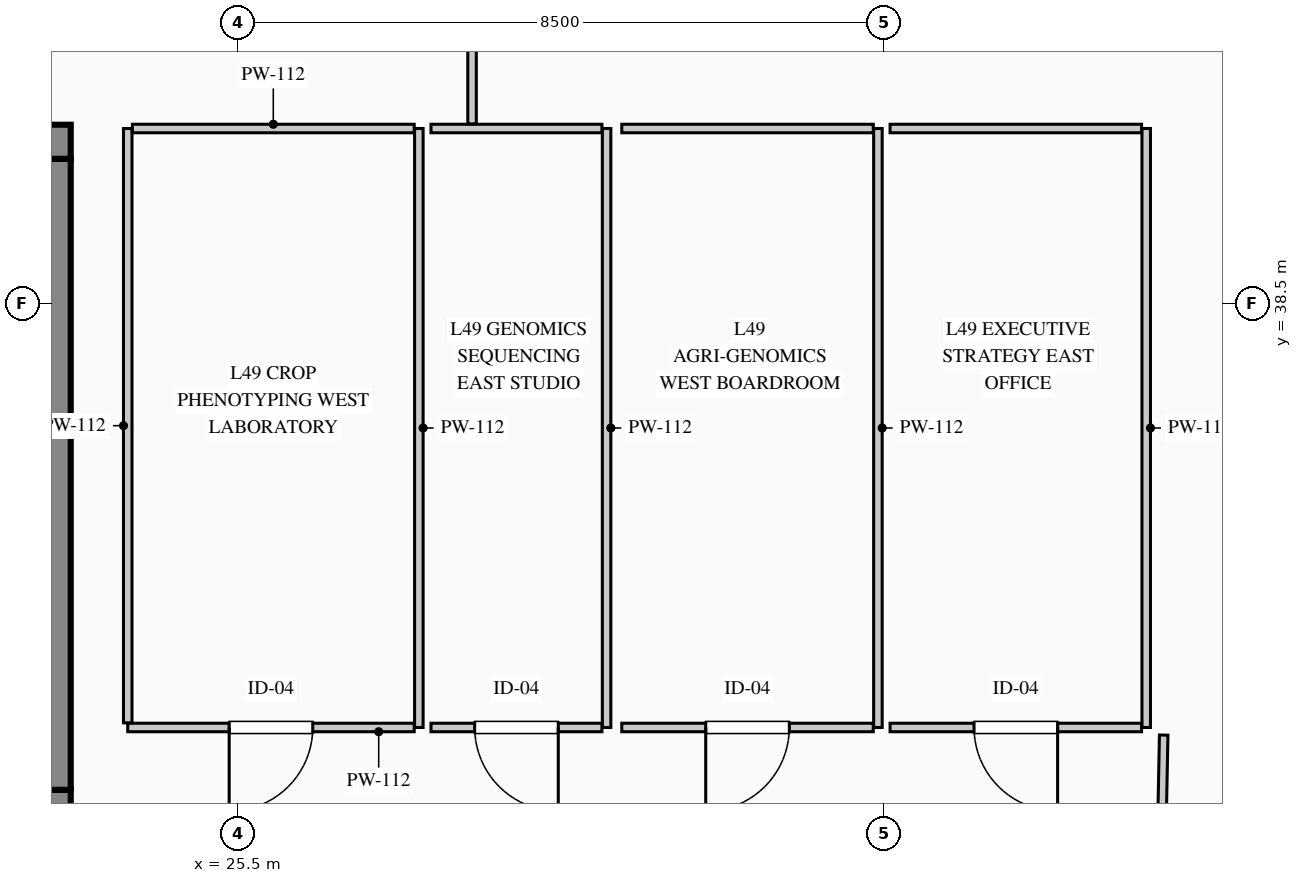
"""IFC4 building model, lengths in metres.
Left out: names, types, materials, properties, quantities, classifications, styles, units other than length and angle.
Written with IfcOpenShell. Run it as: python <this file> out.ifc"""

import sys

from ifc_helpers import new_model, si_unit, direction, frame, frame_2d, origin, place, context, subcontext, project, spatial, rectangle, extrude, element, fill, save


model = new_model("IFC4")
c1 = context("Model", 3, precision=1e-05, world=origin(), true_north=direction((0.0, 1.0)))
c2 = subcontext(c1, "Body", "Model", "MODEL_VIEW")
j1 = project(units=[si_unit("LENGTHUNIT", "METRE"), si_unit("PLANEANGLEUNIT", "RADIAN")], contexts=[c1])
p1 = place(None, origin())
s1 = spatial("IfcSite", under=j1, at=p1, CompositionType="ELEMENT")
p2 = place(p1, origin())
s2 = spatial("IfcBuilding", under=s1, at=p2, CompositionType="ELEMENT")
p3 = place(p2, frame((0.0, 0.0, 207.45)))
s3 = spatial("IfcBuildingStorey", under=s2, at=p3, CompositionType="ELEMENT", Elevation=207.45)
p4 = place(p3, frame((5.55, 40.625, 0.0), z_axis=(0.0, 0.0, 1.0), x_axis=(1.0, 0.0, 0.0)))
e1 = element("IfcWall", 1, at=p4, inside=s3, PredefinedType="SHEAR", context=c2, shape_type="SweptSolid", body=[
    extrude(rectangle(XDim=17.75, YDim=0.45, at=frame_2d((8.875, 0.0))), origin(), (0.0, 0.0, 1.0), 3.95),
])
p5 = place(p4, frame((15.895, 0.0, 0.0)))
e2 = element("IfcOpeningElement", 2, at=p5, cuts=e1, PredefinedType="OPENING", context=c2, shape_type="SweptSolid", body=[
    extrude(rectangle(XDim=1.18, YDim=2.25, at=frame_2d((0.59, 1.125))), frame((0.0, 0.235, 0.0), z_axis=(0.0, -1.0, 0.0), x_axis=(1.0, 0.0, 0.0)), (0.0, 0.0, 1.0), 0.47),
])
p6 = place(p3, frame((5.55, 31.875, 0.0), z_axis=(0.0, 0.0, 1.0), x_axis=(1.0, 0.0, 0.0)))
e3 = element("IfcWall", 3, at=p6, inside=s3, PredefinedType="SHEAR", context=c2, shape_type="SweptSolid", body=[
    extrude(rectangle(XDim=17.75, YDim=0.45, at=frame_2d((8.875, 0.0))), origin(), (0.0, 0.0, 1.0), 3.95),
])
p7 = place(p6, frame((3.1, 0.0, 0.0)))
e4 = element("IfcOpeningElement", 4, at=p7, cuts=e3, PredefinedType="OPENING", context=c2, shape_type="SweptSolid", body=[
    extrude(rectangle(XDim=1.2, YDim=2.2, at=frame_2d((0.6, 1.1))), frame((0.0, 0.235, 0.0), z_axis=(0.0, -1.0, 0.0), x_axis=(1.0, 0.0, 0.0)), (0.0, 0.0, 1.0), 0.47),
])
p8 = place(p6, frame((6.95, 0.0, 0.0)))
e5 = element("IfcOpeningElement", 5, at=p8, cuts=e3, PredefinedType="OPENING", context=c2, shape_type="SweptSolid", body=[
    extrude(rectangle(XDim=1.2, YDim=2.2, at=frame_2d((0.6, 1.1))), frame((0.0, 0.235, 0.0), z_axis=(0.0, -1.0, 0.0), x_axis=(1.0, 0.0, 0.0)), (0.0, 0.0, 1.0), 0.47),
])
p9 = place(p6, frame((8.8, 0.0, 0.0)))
e6 = element("IfcOpeningElement", 6, at=p9, cuts=e3, PredefinedType="OPENING", context=c2, shape_type="SweptSolid", body=[
    extrude(rectangle(XDim=1.15, YDim=2.2, at=frame_2d((0.575, 1.1))), frame((0.0, 0.235, 0.0), z_axis=(0.0, -1.0, 0.0), x_axis=(1.0, 0.0, 0.0)), (0.0, 0.0, 1.0), 0.47),
])
p10 = place(p6, frame((15.9, 0.0, 0.0)))
e7 = element("IfcOpeningElement", 7, at=p10, cuts=e3, PredefinedType="OPENING", context=c2, shape_type="SweptSolid", body=[
    extrude(rectangle(XDim=1.2, YDim=2.2, at=frame_2d((0.6, 1.1))), frame((0.0, 0.235, 0.0), z_axis=(0.0, -1.0, 0.0), x_axis=(1.0, 0.0, 0.0)), (0.0, 0.0, 1.0), 0.47),
])
p11 = place(p3, frame((23.075, 32.1, 0.0), z_axis=(0.0, 0.0, 1.0), x_axis=(0.0, 1.0, 0.0)))
e8 = element("IfcWall", 8, at=p11, inside=s3, PredefinedType="SHEAR", context=c2, shape_type="SweptSolid", body=[
    extrude(rectangle(XDim=8.3, YDim=0.45, at=frame_2d((4.15, 0.0))), origin(), (0.0, 0.0, 1.0), 3.95),
])
p12 = place(p3, frame((27.88, 40.8, 0.0), z_axis=(0.0, 0.0, 1.0), x_axis=(0.0, -1.0, 0.0)))
e9 = element("IfcWall", 9, at=p12, inside=s3, PredefinedType="PARTITIONING", context=c2, shape_type="SweptSolid", body=[
    extrude(rectangle(XDim=7.88, YDim=0.112, at=frame_2d((3.94, 0.0))), origin(), (0.0, 0.0, 1.0), 3.7),
])
p13 = place(p3, frame((27.819, 32.92, 0.0), z_axis=(0.0, 0.0, 1.0), x_axis=(-1.0, 0.0, 0.0)))
e10 = element("IfcWall", 10, at=p13, inside=s3, PredefinedType="PARTITIONING", context=c2, shape_type="SweptSolid", body=[
    extrude(rectangle(XDim=3.769, YDim=0.112, at=frame_2d((1.885, 0.0))), origin(), (0.0, 0.0, 1.0), 3.7),
])
p14 = place(p13, frame((1.334, 0.0, 0.0)))
e11 = element("IfcOpeningElement", 11, at=p14, cuts=e10, PredefinedType="OPENING", context=c2, shape_type="SweptSolid", body=[
    extrude(rectangle(XDim=1.1, YDim=2.2, at=frame_2d((0.55, 1.1))), frame((0.0, 0.066, 0.0), z_axis=(0.0, -1.0, 0.0), x_axis=(1.0, 0.0, 0.0)), (0.0, 0.0, 1.0), 0.132),
])
p15 = place(p3, frame((24.05, 32.981, 0.0), z_axis=(0.0, 0.0, 1.0), x_axis=(0.0, 1.0, 0.0)))
e12 = element("IfcWall", 12, at=p15, inside=s3, PredefinedType="PARTITIONING", context=c2, shape_type="SweptSolid", body=[
    extrude(rectangle(XDim=7.819, YDim=0.112, at=frame_2d((3.91, 0.0))), origin(), (0.0, 0.0, 1.0), 3.7),
])
p16 = place(p3, frame((24.111, 40.8, 0.0), z_axis=(0.0, 0.0, 1.0), x_axis=(1.0, 0.0, 0.0)))
e13 = element("IfcWall", 13, at=p16, inside=s3, PredefinedType="PARTITIONING", context=c2, shape_type="SweptSolid", body=[
    extrude(rectangle(XDim=3.708, YDim=0.112, at=frame_2d((1.854, 0.0))), origin(), (0.0, 0.0, 1.0), 3.7),
])
p17 = place(p3, frame((30.35, 40.8, 0.0), z_axis=(0.0, 0.0, 1.0), x_axis=(0.0, -1.0, 0.0)))
e14 = element("IfcWall", 14, at=p17, inside=s3, PredefinedType="PARTITIONING", context=c2, shape_type="SweptSolid", body=[
    extrude(rectangle(XDim=7.88, YDim=0.112, at=frame_2d((3.94, 0.0))), origin(), (0.0, 0.0, 1.0), 3.7),
])
p18 = place(p3, frame((30.289, 32.92, 0.0), z_axis=(0.0, 0.0, 1.0), x_axis=(-1.0, 0.0, 0.0)))
e15 = element("IfcWall", 15, at=p18, inside=s3, PredefinedType="PARTITIONING", context=c2, shape_type="SweptSolid", body=[
    extrude(rectangle(XDim=2.249, YDim=0.112, at=frame_2d((1.125, 0.0))), origin(), (0.0, 0.0, 1.0), 3.7),
])
p19 = place(p18, frame((0.574, 0.0, 0.0)))
e16 = element("IfcOpeningElement", 16, at=p19, cuts=e15, PredefinedType="OPENING", context=c2, shape_type="SweptSolid", body=[
    extrude(rectangle(XDim=1.1, YDim=2.2, at=frame_2d((0.55, 1.1))), frame((0.0, 0.066, 0.0), z_axis=(0.0, -1.0, 0.0), x_axis=(1.0, 0.0, 0.0)), (0.0, 0.0, 1.0), 0.132),
])
p20 = place(p3, frame((28.04, 40.8, 0.0), z_axis=(0.0, 0.0, 1.0), x_axis=(1.0, 0.0, 0.0)))
e17 = element("IfcWall", 17, at=p20, inside=s3, PredefinedType="PARTITIONING", context=c2, shape_type="SweptSolid", body=[
    extrude(rectangle(XDim=2.249, YDim=0.112, at=frame_2d((1.125, 0.0))), origin(), (0.0, 0.0, 1.0), 3.7),
])
p21 = place(p3, frame((33.92, 40.8, 0.0), z_axis=(0.0, 0.0, 1.0), x_axis=(0.0, -1.0, 0.0)))
e18 = element("IfcWall", 18, at=p21, inside=s3, PredefinedType="PARTITIONING", context=c2, shape_type="SweptSolid", body=[
    extrude(rectangle(XDim=7.88, YDim=0.112, at=frame_2d((3.94, 0.0))), origin(), (0.0, 0.0, 1.0), 3.7),
])
p22 = place(p3, frame((33.859, 32.92, 0.0), z_axis=(0.0, 0.0, 1.0), x_axis=(-1.0, 0.0, 0.0)))
e19 = element("IfcWall", 19, at=p22, inside=s3, PredefinedType="PARTITIONING", context=c2, shape_type="SweptSolid", body=[
    extrude(rectangle(XDim=3.309, YDim=0.112, at=frame_2d((1.654, 0.0))), origin(), (0.0, 0.0, 1.0), 3.7),
])
p23 = place(p22, frame((1.104, 0.0, 0.0)))
e20 = element("IfcOpeningElement", 20, at=p23, cuts=e19, PredefinedType="OPENING", context=c2, shape_type="SweptSolid", body=[
    extrude(rectangle(XDim=1.1, YDim=2.2, at=frame_2d((0.55, 1.1))), frame((0.0, 0.066, 0.0), z_axis=(0.0, -1.0, 0.0), x_axis=(1.0, 0.0, 0.0)), (0.0, 0.0, 1.0), 0.132),
])
p24 = place(p3, frame((30.55, 40.8, 0.0), z_axis=(0.0, 0.0, 1.0), x_axis=(1.0, 0.0, 0.0)))
e21 = element("IfcWall", 21, at=p24, inside=s3, PredefinedType="PARTITIONING", context=c2, shape_type="SweptSolid", body=[
    extrude(rectangle(XDim=3.309, YDim=0.112, at=frame_2d((1.654, 0.0))), origin(), (0.0, 0.0, 1.0), 3.7),
])
p25 = place(p3, frame((37.45, 40.8, 0.0), z_axis=(0.0, 0.0, 1.0), x_axis=(0.0, -1.0, 0.0)))
e22 = element("IfcWall", 22, at=p25, inside=s3, PredefinedType="PARTITIONING", context=c2, shape_type="SweptSolid", body=[
    extrude(rectangle(XDim=7.88, YDim=0.112, at=frame_2d((3.94, 0.0))), origin(), (0.0, 0.0, 1.0), 3.7),
])
p26 = place(p3, frame((37.389, 32.92, 0.0), z_axis=(0.0, 0.0, 1.0), x_axis=(-1.0, 0.0, 0.0)))
e23 = element("IfcWall", 23, at=p26, inside=s3, PredefinedType="PARTITIONING", context=c2, shape_type="SweptSolid", body=[
    extrude(rectangle(XDim=3.309, YDim=0.112, at=frame_2d((1.654, 0.0))), origin(), (0.0, 0.0, 1.0), 3.7),
])
p27 = place(p26, frame((1.104, 0.0, 0.0)))
e24 = element("IfcOpeningElement", 24, at=p27, cuts=e23, PredefinedType="OPENING", context=c2, shape_type="SweptSolid", body=[
    extrude(rectangle(XDim=1.1, YDim=2.2, at=frame_2d((0.55, 1.1))), frame((0.0, 0.066, 0.0), z_axis=(0.0, -1.0, 0.0), x_axis=(1.0, 0.0, 0.0)), (0.0, 0.0, 1.0), 0.132),
])
p28 = place(p3, frame((34.08, 40.8, 0.0), z_axis=(0.0, 0.0, 1.0), x_axis=(1.0, 0.0, 0.0)))
e25 = element("IfcWall", 25, at=p28, inside=s3, PredefinedType="PARTITIONING", context=c2, shape_type="SweptSolid", body=[
    extrude(rectangle(XDim=3.309, YDim=0.112, at=frame_2d((1.654, 0.0))), origin(), (0.0, 0.0, 1.0), 3.7),
])
p29 = place(p3, frame((37.599, 28.691, 0.0), z_axis=(0.0, 0.0, 1.0), x_axis=(0.019566997539, 0.999808547977, 0.0)))
e26 = element("IfcWall", 26, at=p29, inside=s3, PredefinedType="PARTITIONING", context=c2, shape_type="SweptSolid", body=[
    extrude(rectangle(XDim=4.13, YDim=0.112, at=frame_2d((2.065, 0.0))), origin(), (0.0, 0.0, 1.0), 3.7),
])
p30 = place(p29, frame((1.515, 0.0, 0.0)))
e27 = element("IfcOpeningElement", 27, at=p30, cuts=e26, PredefinedType="OPENING", context=c2, shape_type="SweptSolid", body=[
    extrude(rectangle(XDim=1.1, YDim=2.2, at=frame_2d((0.55, 1.1))), frame((0.0, 0.066, 0.0), z_axis=(0.0, -1.0, 0.0), x_axis=(1.0, 0.0, 0.0)), (0.0, 0.0, 1.0), 0.132),
])
p31 = place(p3, frame((28.58, 40.861, 0.0), z_axis=(0.0, 0.0, 1.0), x_axis=(0.0, 1.0, 0.0)))
e28 = element("IfcWall", 28, at=p31, inside=s3, PredefinedType="PARTITIONING", context=c2, shape_type="SweptSolid", body=[
    extrude(rectangle(XDim=2.394, YDim=0.112, at=frame_2d((1.197, 0.0))), origin(), (0.0, 0.0, 1.0), 3.7),
])
p32 = place(p14, origin())
e29 = element("IfcDoor", 29, at=p32, inside=s3, OperationType="SINGLE_SWING_RIGHT", PredefinedType="DOOR", context=c2, shape_type="SweptSolid", body=[
    extrude(rectangle(XDim=1.1, YDim=2.2, at=frame_2d((0.55, 1.1))), frame((0.0, 0.025, 0.0), z_axis=(0.0, -1.0, 0.0), x_axis=(1.0, 0.0, 0.0)), (0.0, 0.0, 1.0), 0.05),
])
fill(e11, e29)
p33 = place(p19, origin())
e30 = element("IfcDoor", 30, at=p33, inside=s3, OperationType="SINGLE_SWING_LEFT", PredefinedType="DOOR", context=c2, shape_type="SweptSolid", body=[
    extrude(rectangle(XDim=1.1, YDim=2.2, at=frame_2d((0.55, 1.1))), frame((0.0, 0.025, 0.0), z_axis=(0.0, -1.0, 0.0), x_axis=(1.0, 0.0, 0.0)), (0.0, 0.0, 1.0), 0.05),
])
fill(e16, e30)
p34 = place(p23, origin())
e31 = element("IfcDoor", 31, at=p34, inside=s3, OperationType="SINGLE_SWING_RIGHT", PredefinedType="DOOR", context=c2, shape_type="SweptSolid", body=[
    extrude(rectangle(XDim=1.1, YDim=2.2, at=frame_2d((0.55, 1.1))), frame((0.0, 0.025, 0.0), z_axis=(0.0, -1.0, 0.0), x_axis=(1.0, 0.0, 0.0)), (0.0, 0.0, 1.0), 0.05),
])
fill(e20, e31)
p35 = place(p27, origin())
e32 = element("IfcDoor", 32, at=p35, inside=s3, OperationType="SINGLE_SWING_LEFT", PredefinedType="DOOR", context=c2, shape_type="SweptSolid", body=[
    extrude(rectangle(XDim=1.1, YDim=2.2, at=frame_2d((0.55, 1.1))), frame((0.0, 0.025, 0.0), z_axis=(0.0, -1.0, 0.0), x_axis=(1.0, 0.0, 0.0)), (0.0, 0.0, 1.0), 0.05),
])
fill(e24, e32)
save(model, sys.argv[1])
